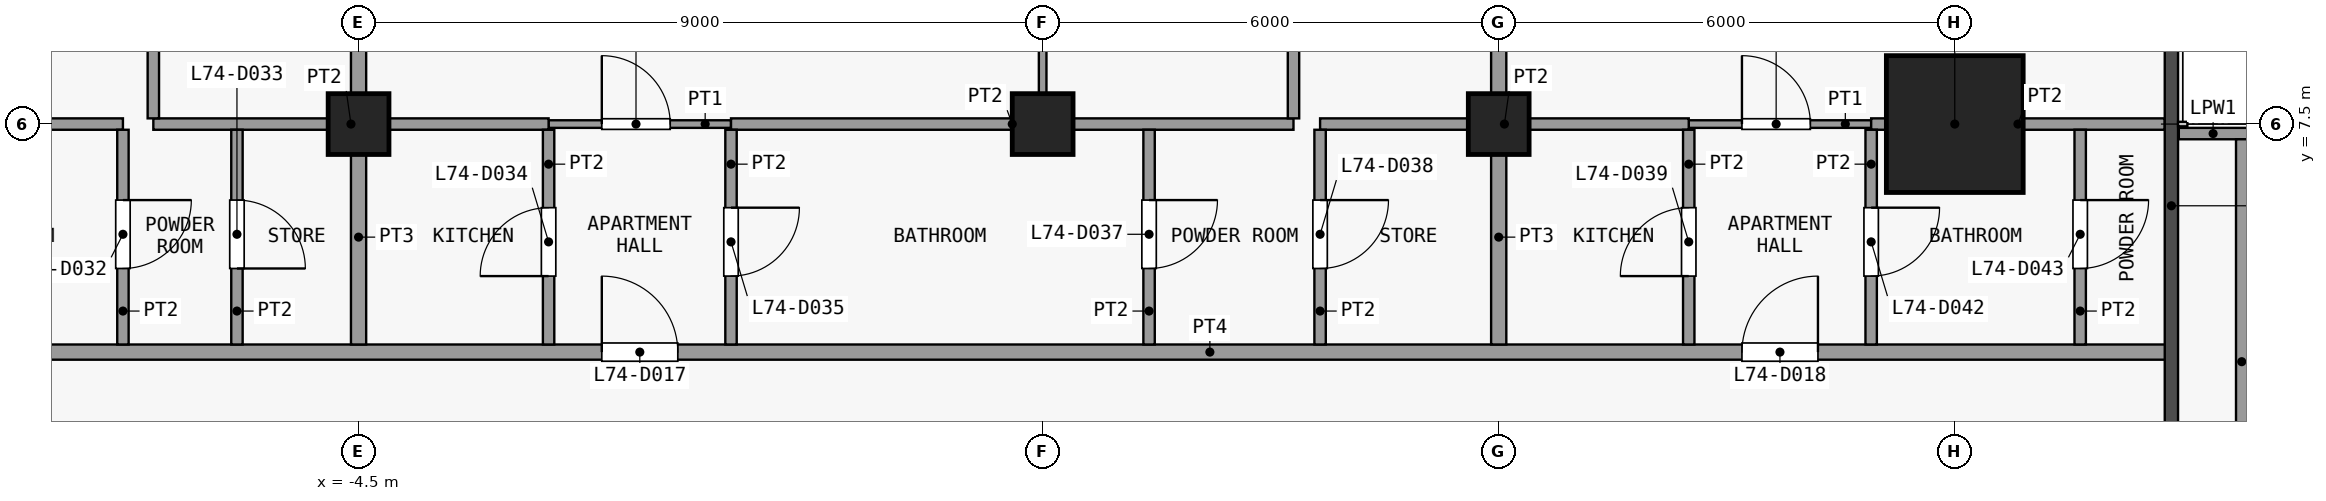
"""IFC4 building model, lengths in metres.
Left out: names, types, materials, properties, quantities, classifications, styles, units other than length and angle.
Written with IfcOpenShell. Run it as: python <this file> out.ifc"""

import sys

from ifc_helpers import new_model, si_unit, direction, frame, frame_2d, origin, origin_2d, place, context, subcontext, project, spatial, rectangle, extrude, element, fill, save


model = new_model("IFC4")
c1 = context("Model", 3, precision=1e-05, world=origin(), true_north=direction((0.0, 1.0)))
c2 = subcontext(c1, "Body", "Model", "MODEL_VIEW")
j1 = project(units=[si_unit("LENGTHUNIT", "METRE"), si_unit("PLANEANGLEUNIT", "RADIAN")], contexts=[c1])
p1 = place(None, origin())
s1 = spatial("IfcSite", under=j1, at=p1, CompositionType="ELEMENT")
p2 = place(p1, origin())
s2 = spatial("IfcBuilding", under=s1, at=p2, CompositionType="ELEMENT")
p3 = place(p2, frame((0.0, 0.0, 291.5)))
s3 = spatial("IfcBuildingStorey", under=s2, at=p3, CompositionType="ELEMENT", Elevation=291.5)
for number, where, z_axis, x_axis in (
    (1, (-4.5, 7.5, 0.0), (0.0, 0.0, 1.0), (1.0, 0.0, 0.0)),
    (2, (4.5, 7.5, 0.0), (0.0, 0.0, 1.0), (1.0, 0.0, 0.0)),
    (3, (10.5, 7.5, 0.0), (0.0, 0.0, 1.0), (1.0, 0.0, 0.0)),
):
    element("IfcColumn", number, at=place(p3, frame(where, z_axis=z_axis, x_axis=x_axis)), inside=s3, PredefinedType="COLUMN", context=c2, shape_type="SweptSolid", body=[
        extrude(rectangle(XDim=0.8, YDim=0.8, at=origin_2d()), origin(), (0.0, 0.0, 1.0), 3.6),
    ])
p4 = place(p3, frame((16.5, 7.5, 0.0), z_axis=(0.0, 0.0, 1.0), x_axis=(1.0, 0.0, 0.0)))
e4 = element("IfcColumn", 4, at=p4, inside=s3, PredefinedType="COLUMN", context=c2, shape_type="SweptSolid", body=[
    extrude(rectangle(XDim=1.8, YDim=1.8, at=origin_2d()), origin(), (0.0, 0.0, 1.0), 3.6),
])
p5 = place(p3, frame((19.448, 7.375, 0.0), z_axis=(0.0, 0.0, 1.0), x_axis=(1.0, 0.0, 0.0)))
e5 = element("IfcWall", 5, at=p5, inside=s3, PredefinedType="PARAPET", context=c2, shape_type="SweptSolid", body=[
    extrude(rectangle(XDim=0.903, YDim=0.15, at=frame_2d((0.451, 0.0))), origin(), (0.0, 0.0, 1.0), 1.15),
])
p6 = place(p3, frame((20.275, 7.3, 0.0), z_axis=(0.0, 0.0, 1.0), x_axis=(0.0, -1.0, 0.0)))
e6 = element("IfcWall", 6, at=p6, inside=s3, PredefinedType="PARAPET", context=c2, shape_type="SweptSolid", body=[
    extrude(rectangle(XDim=5.853, YDim=0.15, at=frame_2d((2.926, 0.0))), origin(), (0.0, 0.0, 1.0), 1.15),
])
p7 = place(p3, frame((-20.25, 4.5, 0.0), z_axis=(0.0, 0.0, 1.0), x_axis=(1.0, 0.0, 0.0)))
e7 = element("IfcWall", 7, at=p7, inside=s3, PredefinedType="PARTITIONING", context=c2, shape_type="SweptSolid", body=[
    extrude(rectangle(XDim=39.6, YDim=0.2, at=frame_2d((19.8, 0.0))), origin(), (0.0, 0.0, 1.0), 3.3),
])
p8 = place(p7, frame((7.95, 0.0, 0.0)))
e8 = element("IfcOpeningElement", 8, at=p8, cuts=e7, PredefinedType="OPENING", context=c2, shape_type="SweptSolid", body=[
    extrude(rectangle(XDim=1.0, YDim=2.1, at=frame_2d((0.5, 1.05))), frame((0.0, 0.11, 0.0), z_axis=(0.0, -1.0, 0.0), x_axis=(1.0, 0.0, 0.0)), (0.0, 0.0, 1.0), 0.22),
])
p9 = place(p7, frame((18.95, 0.0, 0.0)))
e9 = element("IfcOpeningElement", 9, at=p9, cuts=e7, PredefinedType="OPENING", context=c2, shape_type="SweptSolid", body=[
    extrude(rectangle(XDim=1.0, YDim=2.1, at=frame_2d((0.5, 1.05))), frame((0.0, 0.11, 0.0), z_axis=(0.0, -1.0, 0.0), x_axis=(1.0, 0.0, 0.0)), (0.0, 0.0, 1.0), 0.22),
])
p10 = place(p7, frame((33.95, 0.0, 0.0)))
e10 = element("IfcOpeningElement", 10, at=p10, cuts=e7, PredefinedType="OPENING", context=c2, shape_type="SweptSolid", body=[
    extrude(rectangle(XDim=1.0, YDim=2.1, at=frame_2d((0.5, 1.05))), frame((0.0, 0.11, 0.0), z_axis=(0.0, -1.0, 0.0), x_axis=(1.0, 0.0, 0.0)), (0.0, 0.0, 1.0), 0.22),
])
p11 = place(p3, frame((-2.0, 7.5, 0.0), z_axis=(0.0, 0.0, 1.0), x_axis=(1.0, 0.0, 0.0)))
e11 = element("IfcWall", 11, at=p11, inside=s3, PredefinedType="PARTITIONING", context=c2, shape_type="SweptSolid", body=[
    extrude(rectangle(XDim=2.4, YDim=0.1, at=frame_2d((1.2, 0.0))), origin(), (0.0, 0.0, 1.0), 3.3),
])
p12 = place(p11, frame((0.7, 0.0, 0.0)))
e12 = element("IfcOpeningElement", 12, at=p12, cuts=e11, PredefinedType="OPENING", context=c2, shape_type="SweptSolid", body=[
    extrude(rectangle(XDim=0.9, YDim=2.1, at=frame_2d((0.45, 1.05))), frame((0.0, 0.06, 0.0), z_axis=(0.0, -1.0, 0.0), x_axis=(1.0, 0.0, 0.0)), (0.0, 0.0, 1.0), 0.12),
])
p13 = place(p3, frame((13.0, 7.5, 0.0), z_axis=(0.0, 0.0, 1.0), x_axis=(1.0, 0.0, 0.0)))
e13 = element("IfcWall", 13, at=p13, inside=s3, PredefinedType="PARTITIONING", context=c2, shape_type="SweptSolid", body=[
    extrude(rectangle(XDim=2.4, YDim=0.1, at=frame_2d((1.2, 0.0))), origin(), (0.0, 0.0, 1.0), 3.3),
])
p14 = place(p13, frame((0.7, 0.0, 0.0)))
e14 = element("IfcOpeningElement", 14, at=p14, cuts=e13, PredefinedType="OPENING", context=c2, shape_type="SweptSolid", body=[
    extrude(rectangle(XDim=0.9, YDim=2.1, at=frame_2d((0.45, 1.05))), frame((0.0, 0.06, 0.0), z_axis=(0.0, -1.0, 0.0), x_axis=(1.0, 0.0, 0.0)), (0.0, 0.0, 1.0), 0.12),
])
p15 = place(p3, frame((-10.5, 7.5, 0.0), z_axis=(0.0, 0.0, 1.0), x_axis=(1.0, 0.0, 0.0)))
e15 = element("IfcWall", 15, at=p15, inside=s3, PredefinedType="PARTITIONING", context=c2, shape_type="SweptSolid", body=[
    extrude(rectangle(XDim=2.9, YDim=0.15, at=frame_2d((1.45, 0.0))), origin(), (0.0, 0.0, 1.0), 3.3),
])
p16 = place(p3, frame((-7.2, 7.5, 0.0), z_axis=(0.0, 0.0, 1.0), x_axis=(1.0, 0.0, 0.0)))
e16 = element("IfcWall", 16, at=p16, inside=s3, PredefinedType="PARTITIONING", context=c2, shape_type="SweptSolid", body=[
    extrude(rectangle(XDim=5.2, YDim=0.15, at=frame_2d((2.6, 0.0))), origin(), (0.0, 0.0, 1.0), 3.3),
])
p17 = place(p3, frame((0.4, 7.5, 0.0), z_axis=(0.0, 0.0, 1.0), x_axis=(1.0, 0.0, 0.0)))
e17 = element("IfcWall", 17, at=p17, inside=s3, PredefinedType="PARTITIONING", context=c2, shape_type="SweptSolid", body=[
    extrude(rectangle(XDim=7.4, YDim=0.15, at=frame_2d((3.7, 0.0))), origin(), (0.0, 0.0, 1.0), 3.3),
])
p18 = place(p3, frame((8.15, 7.5, 0.0), z_axis=(0.0, 0.0, 1.0), x_axis=(1.0, 0.0, 0.0)))
e18 = element("IfcWall", 18, at=p18, inside=s3, PredefinedType="PARTITIONING", context=c2, shape_type="SweptSolid", body=[
    extrude(rectangle(XDim=4.85, YDim=0.15, at=frame_2d((2.425, 0.0))), origin(), (0.0, 0.0, 1.0), 3.3),
])
p19 = place(p3, frame((15.4, 7.5, 0.0), z_axis=(0.0, 0.0, 1.0), x_axis=(1.0, 0.0, 0.0)))
e19 = element("IfcWall", 19, at=p19, inside=s3, PredefinedType="PARTITIONING", context=c2, shape_type="SweptSolid", body=[
    extrude(rectangle(XDim=3.863, YDim=0.15, at=frame_2d((1.931, 0.0))), origin(), (0.0, 0.0, 1.0), 3.3),
])
p20 = place(p3, frame((-7.6, 4.6, 0.0), z_axis=(0.0, 0.0, 1.0), x_axis=(0.0, 1.0, 0.0)))
e20 = element("IfcWall", 20, at=p20, inside=s3, PredefinedType="PARTITIONING", context=c2, shape_type="SweptSolid", body=[
    extrude(rectangle(XDim=2.825, YDim=0.15, at=frame_2d((1.413, 0.0))), origin(), (0.0, 0.0, 1.0), 3.3),
])
p21 = place(p20, frame((1.0, 0.0, 0.0)))
e21 = element("IfcOpeningElement", 21, at=p21, cuts=e20, PredefinedType="OPENING", context=c2, shape_type="SweptSolid", body=[
    extrude(rectangle(XDim=0.9, YDim=2.1, at=frame_2d((0.45, 1.05))), frame((0.0, 0.085, 0.0), z_axis=(0.0, -1.0, 0.0), x_axis=(1.0, 0.0, 0.0)), (0.0, 0.0, 1.0), 0.17),
])
p22 = place(p3, frame((-7.2, 7.575, 0.0), z_axis=(0.0, 0.0, 1.0), x_axis=(0.0, 1.0, 0.0)))
e22 = element("IfcWall", 22, at=p22, inside=s3, PredefinedType="PARTITIONING", context=c2, shape_type="SweptSolid", body=[
    extrude(rectangle(XDim=2.6, YDim=0.15, at=frame_2d((1.3, 0.0))), origin(), (0.0, 0.0, 1.0), 3.3),
])
p23 = place(p3, frame((-6.1, 4.6, 0.0), z_axis=(0.0, 0.0, 1.0), x_axis=(0.0, 1.0, 0.0)))
e23 = element("IfcWall", 23, at=p23, inside=s3, PredefinedType="PARTITIONING", context=c2, shape_type="SweptSolid", body=[
    extrude(rectangle(XDim=2.825, YDim=0.15, at=frame_2d((1.413, 0.0))), origin(), (0.0, 0.0, 1.0), 3.3),
])
p24 = place(p23, frame((1.0, 0.0, 0.0)))
e24 = element("IfcOpeningElement", 24, at=p24, cuts=e23, PredefinedType="OPENING", context=c2, shape_type="SweptSolid", body=[
    extrude(rectangle(XDim=0.9, YDim=2.1, at=frame_2d((0.45, 1.05))), frame((0.0, 0.085, 0.0), z_axis=(0.0, -1.0, 0.0), x_axis=(1.0, 0.0, 0.0)), (0.0, 0.0, 1.0), 0.17),
])
p25 = place(p3, frame((-4.5, 4.6, 0.0), z_axis=(0.0, 0.0, 1.0), x_axis=(0.0, 1.0, 0.0)))
e25 = element("IfcWall", 25, at=p25, inside=s3, PredefinedType="PARTITIONING", context=c2, shape_type="SweptSolid", body=[
    extrude(rectangle(XDim=2.825, YDim=0.2, at=frame_2d((1.413, 0.0))), origin(), (0.0, 0.0, 1.0), 3.3),
])
p26 = place(p3, frame((-4.5, 7.575, 0.0), z_axis=(0.0, 0.0, 1.0), x_axis=(0.0, 1.0, 0.0)))
e26 = element("IfcWall", 26, at=p26, inside=s3, PredefinedType="PARTITIONING", context=c2, shape_type="SweptSolid", body=[
    extrude(rectangle(XDim=7.275, YDim=0.2, at=frame_2d((3.638, 0.0))), origin(), (0.0, 0.0, 1.0), 3.3),
])
p27 = place(p3, frame((-2.0, 4.6, 0.0), z_axis=(0.0, 0.0, 1.0), x_axis=(0.0, 1.0, 0.0)))
e27 = element("IfcWall", 27, at=p27, inside=s3, PredefinedType="PARTITIONING", context=c2, shape_type="SweptSolid", body=[
    extrude(rectangle(XDim=2.825, YDim=0.15, at=frame_2d((1.413, 0.0))), origin(), (0.0, 0.0, 1.0), 3.3),
])
p28 = place(p27, frame((0.9, 0.0, 0.0)))
e28 = element("IfcOpeningElement", 28, at=p28, cuts=e27, PredefinedType="OPENING", context=c2, shape_type="SweptSolid", body=[
    extrude(rectangle(XDim=0.9, YDim=2.1, at=frame_2d((0.45, 1.05))), frame((0.0, 0.085, 0.0), z_axis=(0.0, -1.0, 0.0), x_axis=(1.0, 0.0, 0.0)), (0.0, 0.0, 1.0), 0.17),
])
p29 = place(p3, frame((0.4, 4.6, 0.0), z_axis=(0.0, 0.0, 1.0), x_axis=(0.0, 1.0, 0.0)))
e29 = element("IfcWall", 29, at=p29, inside=s3, PredefinedType="PARTITIONING", context=c2, shape_type="SweptSolid", body=[
    extrude(rectangle(XDim=2.825, YDim=0.15, at=frame_2d((1.413, 0.0))), origin(), (0.0, 0.0, 1.0), 3.3),
])
p30 = place(p29, frame((0.9, 0.0, 0.0)))
e30 = element("IfcOpeningElement", 30, at=p30, cuts=e29, PredefinedType="OPENING", context=c2, shape_type="SweptSolid", body=[
    extrude(rectangle(XDim=0.9, YDim=2.1, at=frame_2d((0.45, 1.05))), frame((0.0, 0.085, 0.0), z_axis=(0.0, -1.0, 0.0), x_axis=(1.0, 0.0, 0.0)), (0.0, 0.0, 1.0), 0.17),
])
p31 = place(p3, frame((4.5, 7.575, 0.0), z_axis=(0.0, 0.0, 1.0), x_axis=(0.0, 1.0, 0.0)))
e31 = element("IfcWall", 31, at=p31, inside=s3, PredefinedType="PARTITIONING", context=c2, shape_type="SweptSolid", body=[
    extrude(rectangle(XDim=8.688, YDim=0.1, at=frame_2d((4.344, 0.0))), origin(), (0.0, 0.0, 1.0), 3.3),
])
p32 = place(p31, frame((4.525, 0.0, 0.0)))
e32 = element("IfcOpeningElement", 32, at=p32, cuts=e31, PredefinedType="OPENING", context=c2, shape_type="SweptSolid", body=[
    extrude(rectangle(XDim=0.9, YDim=2.1, at=frame_2d((0.45, 1.05))), frame((0.0, 0.06, 0.0), z_axis=(0.0, -1.0, 0.0), x_axis=(1.0, 0.0, 0.0)), (0.0, 0.0, 1.0), 0.12),
])
p33 = place(p3, frame((5.9, 4.6, 0.0), z_axis=(0.0, 0.0, 1.0), x_axis=(0.0, 1.0, 0.0)))
e33 = element("IfcWall", 33, at=p33, inside=s3, PredefinedType="PARTITIONING", context=c2, shape_type="SweptSolid", body=[
    extrude(rectangle(XDim=2.825, YDim=0.15, at=frame_2d((1.413, 0.0))), origin(), (0.0, 0.0, 1.0), 3.3),
])
p34 = place(p33, frame((1.0, 0.0, 0.0)))
e34 = element("IfcOpeningElement", 34, at=p34, cuts=e33, PredefinedType="OPENING", context=c2, shape_type="SweptSolid", body=[
    extrude(rectangle(XDim=0.9, YDim=2.1, at=frame_2d((0.45, 1.05))), frame((0.0, 0.085, 0.0), z_axis=(0.0, -1.0, 0.0), x_axis=(1.0, 0.0, 0.0)), (0.0, 0.0, 1.0), 0.17),
])
p35 = place(p3, frame((7.8, 7.575, 0.0), z_axis=(0.0, 0.0, 1.0), x_axis=(0.0, 1.0, 0.0)))
e35 = element("IfcWall", 35, at=p35, inside=s3, PredefinedType="PARTITIONING", context=c2, shape_type="SweptSolid", body=[
    extrude(rectangle(XDim=2.85, YDim=0.15, at=frame_2d((1.425, 0.0))), origin(), (0.0, 0.0, 1.0), 3.3),
])
p36 = place(p3, frame((8.15, 4.6, 0.0), z_axis=(0.0, 0.0, 1.0), x_axis=(0.0, 1.0, 0.0)))
e36 = element("IfcWall", 36, at=p36, inside=s3, PredefinedType="PARTITIONING", context=c2, shape_type="SweptSolid", body=[
    extrude(rectangle(XDim=2.825, YDim=0.15, at=frame_2d((1.413, 0.0))), origin(), (0.0, 0.0, 1.0), 3.3),
])
p37 = place(p36, frame((1.0, 0.0, 0.0)))
e37 = element("IfcOpeningElement", 37, at=p37, cuts=e36, PredefinedType="OPENING", context=c2, shape_type="SweptSolid", body=[
    extrude(rectangle(XDim=0.9, YDim=2.1, at=frame_2d((0.45, 1.05))), frame((0.0, 0.085, 0.0), z_axis=(0.0, -1.0, 0.0), x_axis=(1.0, 0.0, 0.0)), (0.0, 0.0, 1.0), 0.17),
])
p38 = place(p3, frame((10.5, 4.6, 0.0), z_axis=(0.0, 0.0, 1.0), x_axis=(0.0, 1.0, 0.0)))
e38 = element("IfcWall", 38, at=p38, inside=s3, PredefinedType="PARTITIONING", context=c2, shape_type="SweptSolid", body=[
    extrude(rectangle(XDim=2.825, YDim=0.2, at=frame_2d((1.413, 0.0))), origin(), (0.0, 0.0, 1.0), 3.3),
])
p39 = place(p3, frame((10.5, 7.575, 0.0), z_axis=(0.0, 0.0, 1.0), x_axis=(0.0, 1.0, 0.0)))
e39 = element("IfcWall", 39, at=p39, inside=s3, PredefinedType="PARTITIONING", context=c2, shape_type="SweptSolid", body=[
    extrude(rectangle(XDim=8.688, YDim=0.2, at=frame_2d((4.344, 0.0))), origin(), (0.0, 0.0, 1.0), 3.3),
])
p40 = place(p3, frame((13.0, 4.6, 0.0), z_axis=(0.0, 0.0, 1.0), x_axis=(0.0, 1.0, 0.0)))
e40 = element("IfcWall", 40, at=p40, inside=s3, PredefinedType="PARTITIONING", context=c2, shape_type="SweptSolid", body=[
    extrude(rectangle(XDim=2.825, YDim=0.15, at=frame_2d((1.413, 0.0))), origin(), (0.0, 0.0, 1.0), 3.3),
])
p41 = place(p40, frame((0.9, 0.0, 0.0)))
e41 = element("IfcOpeningElement", 41, at=p41, cuts=e40, PredefinedType="OPENING", context=c2, shape_type="SweptSolid", body=[
    extrude(rectangle(XDim=0.9, YDim=2.1, at=frame_2d((0.45, 1.05))), frame((0.0, 0.085, 0.0), z_axis=(0.0, -1.0, 0.0), x_axis=(1.0, 0.0, 0.0)), (0.0, 0.0, 1.0), 0.17),
])
p42 = place(p3, frame((15.4, 4.6, 0.0), z_axis=(0.0, 0.0, 1.0), x_axis=(0.0, 1.0, 0.0)))
e42 = element("IfcWall", 42, at=p42, inside=s3, PredefinedType="PARTITIONING", context=c2, shape_type="SweptSolid", body=[
    extrude(rectangle(XDim=2.825, YDim=0.15, at=frame_2d((1.413, 0.0))), origin(), (0.0, 0.0, 1.0), 3.3),
])
p43 = place(p42, frame((0.9, 0.0, 0.0)))
e43 = element("IfcOpeningElement", 43, at=p43, cuts=e42, PredefinedType="OPENING", context=c2, shape_type="SweptSolid", body=[
    extrude(rectangle(XDim=0.9, YDim=2.1, at=frame_2d((0.45, 1.05))), frame((0.0, 0.085, 0.0), z_axis=(0.0, -1.0, 0.0), x_axis=(1.0, 0.0, 0.0)), (0.0, 0.0, 1.0), 0.17),
])
p44 = place(p3, frame((18.15, 4.6, 0.0), z_axis=(0.0, 0.0, 1.0), x_axis=(0.0, 1.0, 0.0)))
e44 = element("IfcWall", 44, at=p44, inside=s3, PredefinedType="PARTITIONING", context=c2, shape_type="SweptSolid", body=[
    extrude(rectangle(XDim=2.825, YDim=0.15, at=frame_2d((1.413, 0.0))), origin(), (0.0, 0.0, 1.0), 3.3),
])
p45 = place(p44, frame((1.0, 0.0, 0.0)))
e45 = element("IfcOpeningElement", 45, at=p45, cuts=e44, PredefinedType="OPENING", context=c2, shape_type="SweptSolid", body=[
    extrude(rectangle(XDim=0.9, YDim=2.1, at=frame_2d((0.45, 1.05))), frame((0.0, 0.085, 0.0), z_axis=(0.0, -1.0, 0.0), x_axis=(1.0, 0.0, 0.0)), (0.0, 0.0, 1.0), 0.17),
])
p46 = place(p9, origin())
e46 = element("IfcDoor", 46, at=p46, inside=s3, OperationType="SINGLE_SWING_RIGHT", PredefinedType="DOOR", context=c2, shape_type="SweptSolid", body=[
    extrude(rectangle(XDim=1.0, YDim=2.1, at=frame_2d((0.5, 1.05))), frame((0.0, 0.025, 0.0), z_axis=(0.0, -1.0, 0.0), x_axis=(1.0, 0.0, 0.0)), (0.0, 0.0, 1.0), 0.05),
])
fill(e9, e46)
p47 = place(p10, origin())
e47 = element("IfcDoor", 47, at=p47, inside=s3, OperationType="SINGLE_SWING_LEFT", PredefinedType="DOOR", context=c2, shape_type="SweptSolid", body=[
    extrude(rectangle(XDim=1.0, YDim=2.1, at=frame_2d((0.5, 1.05))), frame((0.0, 0.025, 0.0), z_axis=(0.0, -1.0, 0.0), x_axis=(1.0, 0.0, 0.0)), (0.0, 0.0, 1.0), 0.05),
])
fill(e10, e47)
p48 = place(p12, origin())
e48 = element("IfcDoor", 48, at=p48, inside=s3, OperationType="SINGLE_SWING_RIGHT", PredefinedType="DOOR", context=c2, shape_type="SweptSolid", body=[
    extrude(rectangle(XDim=0.9, YDim=2.1, at=frame_2d((0.45, 1.05))), frame((0.0, 0.025, 0.0), z_axis=(0.0, -1.0, 0.0), x_axis=(1.0, 0.0, 0.0)), (0.0, 0.0, 1.0), 0.05),
])
fill(e12, e48)
p49 = place(p14, origin())
e49 = element("IfcDoor", 49, at=p49, inside=s3, OperationType="SINGLE_SWING_RIGHT", PredefinedType="DOOR", context=c2, shape_type="SweptSolid", body=[
    extrude(rectangle(XDim=0.9, YDim=2.1, at=frame_2d((0.45, 1.05))), frame((0.0, 0.025, 0.0), z_axis=(0.0, -1.0, 0.0), x_axis=(1.0, 0.0, 0.0)), (0.0, 0.0, 1.0), 0.05),
])
fill(e14, e49)
p50 = place(p21, origin())
e50 = element("IfcDoor", 50, at=p50, inside=s3, OperationType="SINGLE_SWING_RIGHT", PredefinedType="DOOR", context=c2, shape_type="SweptSolid", body=[
    extrude(rectangle(XDim=0.9, YDim=2.1, at=frame_2d((0.45, 1.05))), frame((0.0, 0.025, 0.0), z_axis=(0.0, -1.0, 0.0), x_axis=(1.0, 0.0, 0.0)), (0.0, 0.0, 1.0), 0.05),
])
fill(e21, e50)
p51 = place(p24, origin())
e51 = element("IfcDoor", 51, at=p51, inside=s3, OperationType="SINGLE_SWING_LEFT", PredefinedType="DOOR", context=c2, shape_type="SweptSolid", body=[
    extrude(rectangle(XDim=0.9, YDim=2.1, at=frame_2d((0.45, 1.05))), frame((0.0, 0.025, 0.0), z_axis=(0.0, -1.0, 0.0), x_axis=(1.0, 0.0, 0.0)), (0.0, 0.0, 1.0), 0.05),
])
fill(e24, e51)
p52 = place(p28, origin())
e52 = element("IfcDoor", 52, at=p52, inside=s3, OperationType="SINGLE_SWING_RIGHT", PredefinedType="DOOR", context=c2, shape_type="SweptSolid", body=[
    extrude(rectangle(XDim=0.9, YDim=2.1, at=frame_2d((0.45, 1.05))), frame((0.0, 0.025, 0.0), z_axis=(0.0, -1.0, 0.0), x_axis=(1.0, 0.0, 0.0)), (0.0, 0.0, 1.0), 0.05),
])
fill(e28, e52)
p53 = place(p30, origin())
e53 = element("IfcDoor", 53, at=p53, inside=s3, OperationType="SINGLE_SWING_RIGHT", PredefinedType="DOOR", context=c2, shape_type="SweptSolid", body=[
    extrude(rectangle(XDim=0.9, YDim=2.1, at=frame_2d((0.45, 1.05))), frame((0.0, 0.025, 0.0), z_axis=(0.0, -1.0, 0.0), x_axis=(1.0, 0.0, 0.0)), (0.0, 0.0, 1.0), 0.05),
])
fill(e30, e53)
p54 = place(p34, origin())
e54 = element("IfcDoor", 54, at=p54, inside=s3, OperationType="SINGLE_SWING_RIGHT", PredefinedType="DOOR", context=c2, shape_type="SweptSolid", body=[
    extrude(rectangle(XDim=0.9, YDim=2.1, at=frame_2d((0.45, 1.05))), frame((0.0, 0.025, 0.0), z_axis=(0.0, -1.0, 0.0), x_axis=(1.0, 0.0, 0.0)), (0.0, 0.0, 1.0), 0.05),
])
fill(e34, e54)
p55 = place(p37, origin())
e55 = element("IfcDoor", 55, at=p55, inside=s3, OperationType="SINGLE_SWING_RIGHT", PredefinedType="DOOR", context=c2, shape_type="SweptSolid", body=[
    extrude(rectangle(XDim=0.9, YDim=2.1, at=frame_2d((0.45, 1.05))), frame((0.0, 0.025, 0.0), z_axis=(0.0, -1.0, 0.0), x_axis=(1.0, 0.0, 0.0)), (0.0, 0.0, 1.0), 0.05),
])
fill(e37, e55)
p56 = place(p41, origin())
e56 = element("IfcDoor", 56, at=p56, inside=s3, OperationType="SINGLE_SWING_RIGHT", PredefinedType="DOOR", context=c2, shape_type="SweptSolid", body=[
    extrude(rectangle(XDim=0.9, YDim=2.1, at=frame_2d((0.45, 1.05))), frame((0.0, 0.025, 0.0), z_axis=(0.0, -1.0, 0.0), x_axis=(1.0, 0.0, 0.0)), (0.0, 0.0, 1.0), 0.05),
])
fill(e41, e56)
p57 = place(p43, origin())
e57 = element("IfcDoor", 57, at=p57, inside=s3, OperationType="SINGLE_SWING_RIGHT", PredefinedType="DOOR", context=c2, shape_type="SweptSolid", body=[
    extrude(rectangle(XDim=0.9, YDim=2.1, at=frame_2d((0.45, 1.05))), frame((0.0, 0.025, 0.0), z_axis=(0.0, -1.0, 0.0), x_axis=(1.0, 0.0, 0.0)), (0.0, 0.0, 1.0), 0.05),
])
fill(e43, e57)
p58 = place(p45, origin())
e58 = element("IfcDoor", 58, at=p58, inside=s3, OperationType="SINGLE_SWING_RIGHT", PredefinedType="DOOR", context=c2, shape_type="SweptSolid", body=[
    extrude(rectangle(XDim=0.9, YDim=2.1, at=frame_2d((0.45, 1.05))), frame((0.0, 0.025, 0.0), z_axis=(0.0, -1.0, 0.0), x_axis=(1.0, 0.0, 0.0)), (0.0, 0.0, 1.0), 0.05),
])
fill(e45, e58)
save(model, sys.argv[1])
